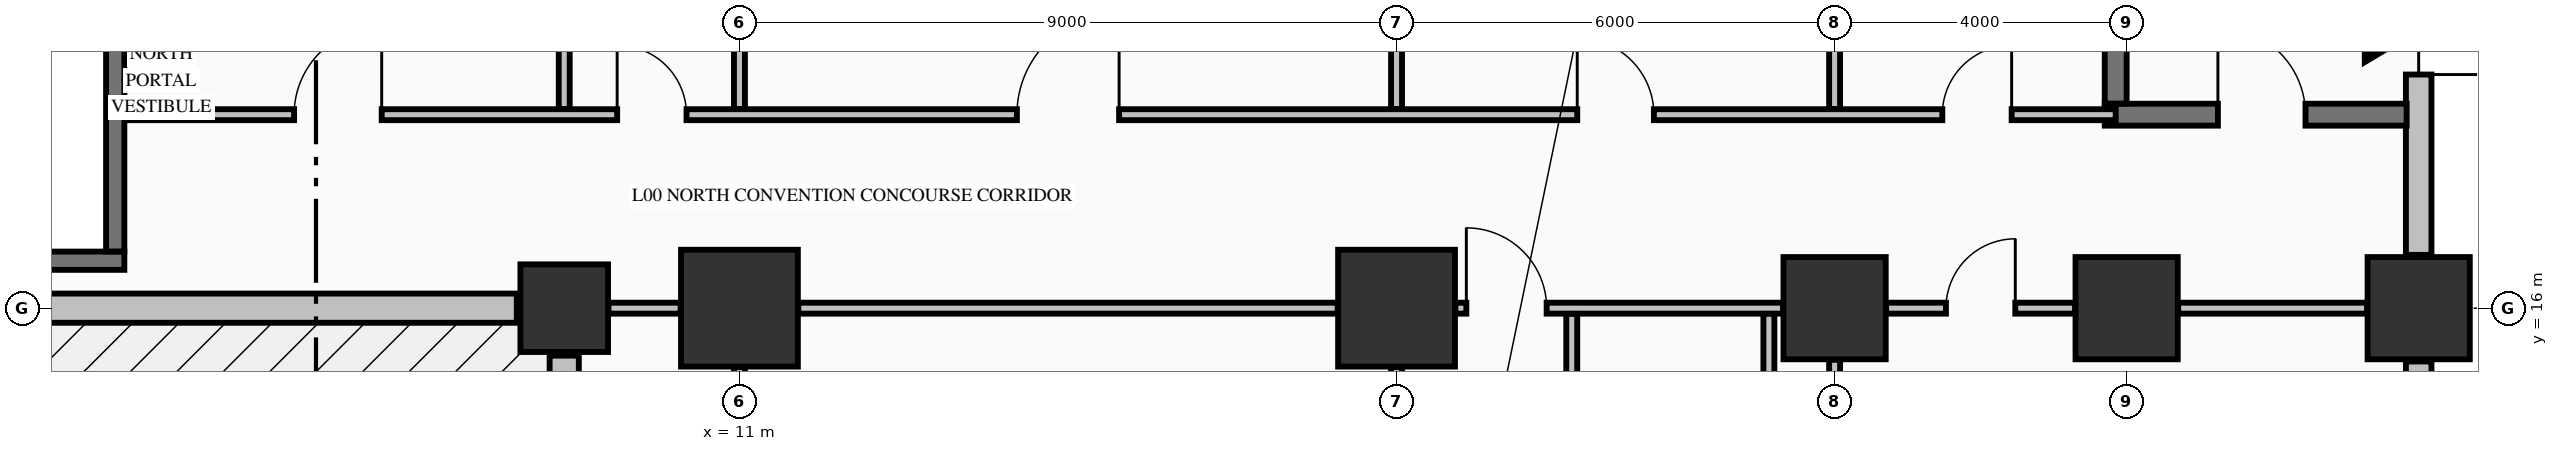
"""IFC4 building model, lengths in metres.
Left out: names, types, materials, properties, quantities, classifications, styles, units other than length and angle.
Written with IfcOpenShell. Run it as: python <this file> out.ifc"""

import sys

from ifc_helpers import new_model, si_unit, direction, frame, frame_2d, origin, origin_2d, place, context, subcontext, project, spatial, rectangle, extrude, element, fill, save


model = new_model("IFC4")
c1 = context("Model", 3, precision=1e-05, world=origin(), true_north=direction((0.0, 1.0)))
c2 = subcontext(c1, "Body", "Model", "MODEL_VIEW")
j1 = project(units=[si_unit("LENGTHUNIT", "METRE"), si_unit("PLANEANGLEUNIT", "RADIAN")], contexts=[c1])
p1 = place(None, origin())
s1 = spatial("IfcSite", under=j1, at=p1, CompositionType="ELEMENT")
p2 = place(p1, origin())
s2 = spatial("IfcBuilding", under=s1, at=p2, CompositionType="ELEMENT")
p3 = place(p2, origin())
s3 = spatial("IfcBuildingStorey", under=s2, at=p3, CompositionType="ELEMENT", Elevation=0.0)
for number, where, z_axis, x_axis in (
    (1, (11.0, 16.0, 0.0), (0.0, 0.0, 1.0), (1.0, 0.0, 0.0)),
    (2, (20.0, 16.0, 0.0), (0.0, 0.0, 1.0), (1.0, 0.0, 0.0)),
):
    element("IfcColumn", number, at=place(p3, frame(where, z_axis=z_axis, x_axis=x_axis)), inside=s3, PredefinedType="COLUMN", context=c2, shape_type="SweptSolid", body=[
        extrude(rectangle(XDim=1.6, YDim=1.6, at=origin_2d()), origin(), (0.0, 0.0, 1.0), 5.09),
    ])
for number, where, z_axis, x_axis in (
    (3, (26.0, 16.0, 0.0), (0.0, 0.0, 1.0), (1.0, 0.0, 0.0)),
    (4, (30.0, 16.0, 0.0), (0.0, 0.0, 1.0), (1.0, 0.0, 0.0)),
    (5, (34.0, 16.0, 0.0), (0.0, 0.0, 1.0), (1.0, 0.0, 0.0)),
):
    element("IfcColumn", number, at=place(p3, frame(where, z_axis=z_axis, x_axis=x_axis)), inside=s3, PredefinedType="COLUMN", context=c2, shape_type="SweptSolid", body=[
        extrude(rectangle(XDim=1.4, YDim=1.4, at=origin_2d()), origin(), (0.0, 0.0, 1.0), 5.09),
    ])
p4 = place(p3, frame((8.6, 16.0, 0.0), z_axis=(0.0, 0.0, 1.0), x_axis=(1.0, 0.0, 0.0)))
e6 = element("IfcColumn", 6, at=p4, inside=s3, PredefinedType="COLUMN", context=c2, shape_type="SweptSolid", body=[
    extrude(rectangle(XDim=1.2, YDim=1.2, at=origin_2d()), origin(), (0.0, 0.0, 1.0), 5.09),
])
p5 = place(p3, frame((34.0, 15.27, 0.0), z_axis=(0.0, 0.0, 1.0), x_axis=(0.0, -1.0, 0.0)))
e7 = element("IfcWall", 7, at=p5, inside=s3, PredefinedType="STANDARD", context=c2, shape_type="SweptSolid", body=[
    extrude(rectangle(XDim=5.54, YDim=0.35, at=frame_2d((2.77, 0.0))), origin(), (0.0, 0.0, 1.0), 4.482),
])
p6 = place(p5, frame((1.72, 0.0, 0.75)))
e8 = element("IfcOpeningElement", 8, at=p6, cuts=e7, PredefinedType="OPENING", context=c2, shape_type="SweptSolid", body=[
    extrude(rectangle(XDim=2.1, YDim=1.75, at=frame_2d((1.05, 0.875))), frame((0.0, 0.185, 0.0), z_axis=(0.0, -1.0, 0.0), x_axis=(1.0, 0.0, 0.0)), (0.0, 0.0, 1.0), 0.37),
])
p7 = place(p3, frame((34.0, 21.27, 0.0), z_axis=(0.0, 0.0, 1.0), x_axis=(0.0, -1.0, 0.0)))
e9 = element("IfcWall", 9, at=p7, inside=s3, PredefinedType="STANDARD", context=c2, shape_type="SweptSolid", body=[
    extrude(rectangle(XDim=4.54, YDim=0.35, at=frame_2d((2.27, 0.0))), origin(), (0.0, 0.0, 1.0), 5.09),
])
p8 = place(p7, frame((0.87, 0.0, 0.0)))
e10 = element("IfcOpeningElement", 10, at=p8, cuts=e9, PredefinedType="OPENING", context=c2, shape_type="SweptSolid", body=[
    extrude(rectangle(XDim=1.2, YDim=2.2, at=frame_2d((0.6, 1.1))), frame((0.0, 0.185, 0.0), z_axis=(0.0, -1.0, 0.0), x_axis=(1.0, 0.0, 0.0)), (0.0, 0.0, 1.0), 0.37),
])
p9 = place(p3, frame((8.6, 15.35, 0.0), z_axis=(0.0, 0.0, 1.0), x_axis=(0.0, -1.0, 0.0)))
e11 = element("IfcWall", 11, at=p9, inside=s3, PredefinedType="STANDARD", context=c2, shape_type="SweptSolid", body=[
    extrude(rectangle(XDim=14.7, YDim=0.4, at=frame_2d((7.35, 0.0))), origin(), (0.0, 0.0, 1.0), 4.132),
])
p10 = place(p3, frame((0.73, 16.0, 0.0), z_axis=(0.0, 0.0, 1.0), x_axis=(1.0, 0.0, 0.0)))
e12 = element("IfcWall", 12, at=p10, inside=s3, PredefinedType="STANDARD", context=c2, shape_type="SweptSolid", body=[
    extrude(rectangle(XDim=7.22, YDim=0.4, at=frame_2d((3.61, 0.0))), origin(), (0.0, 0.0, 1.0), 4.132),
])
p11 = place(p3, frame((0.704, 16.65, 0.0), z_axis=(0.0, 0.0, 1.0), x_axis=(1.0, 0.0, 0.0)))
e13 = element("IfcWall", 13, at=p11, inside=s3, PredefinedType="SOLIDWALL", context=c2, shape_type="SweptSolid", body=[
    extrude(rectangle(XDim=1.871, YDim=0.25, at=frame_2d((0.936, 0.0))), origin(), (0.0, 0.0, 1.0), 5.09),
])
p12 = place(p3, frame((29.7, 18.65, 0.0), z_axis=(0.0, 0.0, 1.0), x_axis=(1.0, 0.0, 0.0)))
e14 = element("IfcWall", 14, at=p12, inside=s3, PredefinedType="SHEAR", context=c2, shape_type="SweptSolid", body=[
    extrude(rectangle(XDim=4.135, YDim=0.3, at=frame_2d((2.067, 0.0))), origin(), (0.0, 0.0, 1.0), 5.09),
])
p13 = place(p12, frame((1.55, 0.0, 0.0)))
e15 = element("IfcOpeningElement", 15, at=p13, cuts=e14, PredefinedType="OPENING", context=c2, shape_type="SweptSolid", body=[
    extrude(rectangle(XDim=1.2, YDim=2.15, at=frame_2d((0.6, 1.075))), frame((0.0, 0.16, 0.0), z_axis=(0.0, -1.0, 0.0), x_axis=(1.0, 0.0, 0.0)), (0.0, 0.0, 1.0), 0.32),
])
p14 = place(p3, frame((9.206, 16.0, 0.0), z_axis=(0.0, 0.0, 1.0), x_axis=(1.0, 0.0, 0.0)))
e16 = element("IfcWall", 16, at=p14, inside=s3, PredefinedType="PARTITIONING", context=c2, shape_type="SweptSolid", body=[
    extrude(rectangle(XDim=0.988, YDim=0.15, at=frame_2d((0.494, 0.0))), origin(), (0.0, 0.0, 1.0), 4.132),
])
p15 = place(p3, frame((11.806, 16.0, 0.0), z_axis=(0.0, 0.0, 1.0), x_axis=(1.0, 0.0, 0.0)))
e17 = element("IfcWall", 17, at=p15, inside=s3, PredefinedType="PARTITIONING", context=c2, shape_type="SweptSolid", body=[
    extrude(rectangle(XDim=7.388, YDim=0.15, at=frame_2d((3.694, 0.0))), origin(), (0.0, 0.0, 1.0), 4.132),
])
p16 = place(p3, frame((20.806, 16.0, 0.0), z_axis=(0.0, 0.0, 1.0), x_axis=(1.0, 0.0, 0.0)))
e18 = element("IfcWall", 18, at=p16, inside=s3, PredefinedType="PARTITIONING", context=c2, shape_type="SweptSolid", body=[
    extrude(rectangle(XDim=4.488, YDim=0.15, at=frame_2d((2.244, 0.0))), origin(), (0.0, 0.0, 1.0), 4.132),
])
p17 = place(p16, frame((0.15, 0.0, 0.0)))
e19 = element("IfcOpeningElement", 19, at=p17, cuts=e18, PredefinedType="OPENING", context=c2, shape_type="SweptSolid", body=[
    extrude(rectangle(XDim=1.1, YDim=2.15, at=frame_2d((0.55, 1.075))), frame((0.0, 0.085, 0.0), z_axis=(0.0, -1.0, 0.0), x_axis=(1.0, 0.0, 0.0)), (0.0, 0.0, 1.0), 0.17),
])
p18 = place(p3, frame((26.706, 16.0, 0.0), z_axis=(0.0, 0.0, 1.0), x_axis=(1.0, 0.0, 0.0)))
e20 = element("IfcWall", 20, at=p18, inside=s3, PredefinedType="PARTITIONING", context=c2, shape_type="SweptSolid", body=[
    extrude(rectangle(XDim=2.588, YDim=0.15, at=frame_2d((1.294, 0.0))), origin(), (0.0, 0.0, 1.0), 4.132),
])
p19 = place(p18, frame((0.819, 0.0, 0.0)))
e21 = element("IfcOpeningElement", 21, at=p19, cuts=e20, PredefinedType="OPENING", context=c2, shape_type="SweptSolid", body=[
    extrude(rectangle(XDim=0.95, YDim=2.15, at=frame_2d((0.475, 1.075))), frame((0.0, 0.085, 0.0), z_axis=(0.0, -1.0, 0.0), x_axis=(1.0, 0.0, 0.0)), (0.0, 0.0, 1.0), 0.17),
])
p20 = place(p3, frame((30.706, 16.0, 0.0), z_axis=(0.0, 0.0, 1.0), x_axis=(1.0, 0.0, 0.0)))
e22 = element("IfcWall", 22, at=p20, inside=s3, PredefinedType="PARTITIONING", context=c2, shape_type="SweptSolid", body=[
    extrude(rectangle(XDim=2.588, YDim=0.15, at=frame_2d((1.294, 0.0))), origin(), (0.0, 0.0, 1.0), 4.132),
])
p21 = place(p3, frame((2.578, 18.65, 0.0), z_axis=(0.0, 0.0, 1.0), x_axis=(1.0, 0.0, 0.0)))
e23 = element("IfcWall", 23, at=p21, inside=s3, PredefinedType="PARTITIONING", context=c2, shape_type="SweptSolid", body=[
    extrude(rectangle(XDim=27.272, YDim=0.15, at=frame_2d((13.636, 0.0))), origin(), (0.0, 0.0, 1.0), 5.09),
])
p22 = place(p21, frame((2.322, 0.0, 0.0)))
e24 = element("IfcOpeningElement", 24, at=p22, cuts=e23, PredefinedType="OPENING", context=c2, shape_type="SweptSolid", body=[
    extrude(rectangle(XDim=1.2, YDim=2.15, at=frame_2d((0.6, 1.075))), frame((0.0, 0.085, 0.0), z_axis=(0.0, -1.0, 0.0), x_axis=(1.0, 0.0, 0.0)), (0.0, 0.0, 1.0), 0.17),
])
p23 = place(p21, frame((6.747, 0.0, 0.0)))
e25 = element("IfcOpeningElement", 25, at=p23, cuts=e23, PredefinedType="OPENING", context=c2, shape_type="SweptSolid", body=[
    extrude(rectangle(XDim=0.95, YDim=2.15, at=frame_2d((0.475, 1.075))), frame((0.0, 0.085, 0.0), z_axis=(0.0, -1.0, 0.0), x_axis=(1.0, 0.0, 0.0)), (0.0, 0.0, 1.0), 0.17),
])
p24 = place(p21, frame((12.222, 0.0, 0.0)))
e26 = element("IfcOpeningElement", 26, at=p24, cuts=e23, PredefinedType="OPENING", context=c2, shape_type="SweptSolid", body=[
    extrude(rectangle(XDim=1.4, YDim=2.2, at=frame_2d((0.7, 1.1))), frame((0.0, 0.085, 0.0), z_axis=(0.0, -1.0, 0.0), x_axis=(1.0, 0.0, 0.0)), (0.0, 0.0, 1.0), 0.17),
])
p25 = place(p21, frame((19.897, 0.0, 0.0)))
e27 = element("IfcOpeningElement", 27, at=p25, cuts=e23, PredefinedType="OPENING", context=c2, shape_type="SweptSolid", body=[
    extrude(rectangle(XDim=1.05, YDim=2.15, at=frame_2d((0.525, 1.075))), frame((0.0, 0.085, 0.0), z_axis=(0.0, -1.0, 0.0), x_axis=(1.0, 0.0, 0.0)), (0.0, 0.0, 1.0), 0.17),
])
p26 = place(p21, frame((24.897, 0.0, 0.0)))
e28 = element("IfcOpeningElement", 28, at=p26, cuts=e23, PredefinedType="OPENING", context=c2, shape_type="SweptSolid", body=[
    extrude(rectangle(XDim=0.95, YDim=2.15, at=frame_2d((0.475, 1.075))), frame((0.0, 0.085, 0.0), z_axis=(0.0, -1.0, 0.0), x_axis=(1.0, 0.0, 0.0)), (0.0, 0.0, 1.0), 0.17),
])
p27 = place(p3, frame((2.45, 16.777, 0.0), z_axis=(0.0, 0.0, 1.0), x_axis=(0.0, 1.0, 0.0)))
e29 = element("IfcWall", 29, at=p27, inside=s3, PredefinedType="SOLIDWALL", context=c2, shape_type="SweptSolid", body=[
    extrude(rectangle(XDim=4.446, YDim=0.25, at=frame_2d((2.223, 0.0))), origin(), (0.0, 0.0, 1.0), 5.09),
])
p28 = place(p3, frame((29.85, 18.802, 0.0), z_axis=(0.0, 0.0, 1.0), x_axis=(0.0, 1.0, 0.0)))
e30 = element("IfcWall", 30, at=p28, inside=s3, PredefinedType="SHEAR", context=c2, shape_type="SweptSolid", body=[
    extrude(rectangle(XDim=9.494, YDim=0.3, at=frame_2d((4.747, 0.0))), origin(), (0.0, 0.0, 1.0), 5.09),
])
p29 = place(p3, frame((8.6, 18.728, 0.0), z_axis=(0.0, 0.0, 1.0), x_axis=(0.0, 1.0, 0.0)))
e31 = element("IfcWall", 31, at=p29, inside=s3, PredefinedType="PARTITIONING", context=c2, shape_type="SweptSolid", body=[
    extrude(rectangle(XDim=2.666, YDim=0.15, at=frame_2d((1.333, 0.0))), origin(), (0.0, 0.0, 1.0), 4.132),
])
p30 = place(p3, frame((11.0, 13.078, 0.0), z_axis=(0.0, 0.0, 1.0), x_axis=(0.0, 1.0, 0.0)))
e32 = element("IfcWall", 32, at=p30, inside=s3, PredefinedType="PARTITIONING", context=c2, shape_type="SweptSolid", body=[
    extrude(rectangle(XDim=2.116, YDim=0.15, at=frame_2d((1.058, 0.0))), origin(), (0.0, 0.0, 1.0), 4.132),
])
p31 = place(p3, frame((11.0, 18.728, 0.0), z_axis=(0.0, 0.0, 1.0), x_axis=(0.0, 1.0, 0.0)))
e33 = element("IfcWall", 33, at=p31, inside=s3, PredefinedType="PARTITIONING", context=c2, shape_type="SweptSolid", body=[
    extrude(rectangle(XDim=2.466, YDim=0.15, at=frame_2d((1.233, 0.0))), origin(), (0.0, 0.0, 1.0), 4.132),
])
p32 = place(p3, frame((20.0, 13.078, 0.0), z_axis=(0.0, 0.0, 1.0), x_axis=(0.0, 1.0, 0.0)))
e34 = element("IfcWall", 34, at=p32, inside=s3, PredefinedType="PARTITIONING", context=c2, shape_type="SweptSolid", body=[
    extrude(rectangle(XDim=2.116, YDim=0.15, at=frame_2d((1.058, 0.0))), origin(), (0.0, 0.0, 1.0), 4.132),
])
p33 = place(p3, frame((20.0, 18.728, 0.0), z_axis=(0.0, 0.0, 1.0), x_axis=(0.0, 1.0, 0.0)))
e35 = element("IfcWall", 35, at=p33, inside=s3, PredefinedType="PARTITIONING", context=c2, shape_type="SweptSolid", body=[
    extrude(rectangle(XDim=2.466, YDim=0.15, at=frame_2d((1.233, 0.0))), origin(), (0.0, 0.0, 1.0), 4.132),
])
p34 = place(p3, frame((22.4, 13.228, 0.0), z_axis=(0.0, 0.0, 1.0), x_axis=(0.0, 1.0, 0.0)))
e36 = element("IfcWall", 36, at=p34, inside=s3, PredefinedType="PARTITIONING", context=c2, shape_type="SweptSolid", body=[
    extrude(rectangle(XDim=2.694, YDim=0.15, at=frame_2d((1.347, 0.0))), origin(), (0.0, 0.0, 1.0), 5.09),
])
p35 = place(p34, frame((0.797, 0.0, 0.0)))
e37 = element("IfcOpeningElement", 37, at=p35, cuts=e36, PredefinedType="OPENING", context=c2, shape_type="SweptSolid", body=[
    extrude(rectangle(XDim=1.05, YDim=2.15, at=frame_2d((0.525, 1.075))), frame((0.0, 0.085, 0.0), z_axis=(0.0, -1.0, 0.0), x_axis=(1.0, 0.0, 0.0)), (0.0, 0.0, 1.0), 0.17),
])
p36 = place(p3, frame((25.1, 13.228, 0.0), z_axis=(0.0, 0.0, 1.0), x_axis=(0.0, 1.0, 0.0)))
e38 = element("IfcWall", 38, at=p36, inside=s3, PredefinedType="PARTITIONING", context=c2, shape_type="SweptSolid", body=[
    extrude(rectangle(XDim=2.694, YDim=0.15, at=frame_2d((1.347, 0.0))), origin(), (0.0, 0.0, 1.0), 5.09),
])
p37 = place(p3, frame((26.0, 13.228, 0.0), z_axis=(0.0, 0.0, 1.0), x_axis=(0.0, 1.0, 0.0)))
e39 = element("IfcWall", 39, at=p37, inside=s3, PredefinedType="PARTITIONING", context=c2, shape_type="SweptSolid", body=[
    extrude(rectangle(XDim=2.066, YDim=0.15, at=frame_2d((1.033, 0.0))), origin(), (0.0, 0.0, 1.0), 4.132),
])
p38 = place(p3, frame((26.0, 18.728, 0.0), z_axis=(0.0, 0.0, 1.0), x_axis=(0.0, 1.0, 0.0)))
e40 = element("IfcWall", 40, at=p38, inside=s3, PredefinedType="PARTITIONING", context=c2, shape_type="SweptSolid", body=[
    extrude(rectangle(XDim=2.566, YDim=0.15, at=frame_2d((1.283, 0.0))), origin(), (0.0, 0.0, 1.0), 4.132),
])
p39 = place(p8, origin())
e41 = element("IfcDoor", 41, at=p39, inside=s3, OperationType="SINGLE_SWING_RIGHT", PredefinedType="DOOR", context=c2, shape_type="SweptSolid", body=[
    extrude(rectangle(XDim=1.2, YDim=2.2, at=frame_2d((0.6, 1.1))), frame((0.0, 0.025, 0.0), z_axis=(0.0, -1.0, 0.0), x_axis=(1.0, 0.0, 0.0)), (0.0, 0.0, 1.0), 0.05),
])
fill(e10, e41)
p40 = place(p13, origin())
e42 = element("IfcDoor", 42, at=p40, inside=s3, OperationType="SINGLE_SWING_LEFT", PredefinedType="DOOR", context=c2, shape_type="SweptSolid", body=[
    extrude(rectangle(XDim=1.2, YDim=2.15, at=frame_2d((0.6, 1.075))), frame((0.0, 0.025, 0.0), z_axis=(0.0, -1.0, 0.0), x_axis=(1.0, 0.0, 0.0)), (0.0, 0.0, 1.0), 0.05),
])
fill(e15, e42)
p41 = place(p17, origin())
e43 = element("IfcDoor", 43, at=p41, inside=s3, OperationType="SINGLE_SWING_LEFT", PredefinedType="DOOR", context=c2, shape_type="SweptSolid", body=[
    extrude(rectangle(XDim=1.1, YDim=2.15, at=frame_2d((0.55, 1.075))), frame((0.0, 0.025, 0.0), z_axis=(0.0, -1.0, 0.0), x_axis=(1.0, 0.0, 0.0)), (0.0, 0.0, 1.0), 0.05),
])
fill(e19, e43)
p42 = place(p22, origin())
e44 = element("IfcDoor", 44, at=p42, inside=s3, OperationType="SINGLE_SWING_RIGHT", PredefinedType="DOOR", context=c2, shape_type="SweptSolid", body=[
    extrude(rectangle(XDim=1.2, YDim=2.15, at=frame_2d((0.6, 1.075))), frame((0.0, 0.025, 0.0), z_axis=(0.0, -1.0, 0.0), x_axis=(1.0, 0.0, 0.0)), (0.0, 0.0, 1.0), 0.05),
])
fill(e24, e44)
p43 = place(p19, origin())
e45 = element("IfcDoor", 45, at=p43, inside=s3, OperationType="SINGLE_SWING_RIGHT", PredefinedType="DOOR", context=c2, shape_type="SweptSolid", body=[
    extrude(rectangle(XDim=0.95, YDim=2.15, at=frame_2d((0.475, 1.075))), frame((0.0, 0.025, 0.0), z_axis=(0.0, -1.0, 0.0), x_axis=(1.0, 0.0, 0.0)), (0.0, 0.0, 1.0), 0.05),
])
fill(e21, e45)
p44 = place(p23, origin())
e46 = element("IfcDoor", 46, at=p44, inside=s3, OperationType="SINGLE_SWING_LEFT", PredefinedType="DOOR", context=c2, shape_type="SweptSolid", body=[
    extrude(rectangle(XDim=0.95, YDim=2.15, at=frame_2d((0.475, 1.075))), frame((0.0, 0.025, 0.0), z_axis=(0.0, -1.0, 0.0), x_axis=(1.0, 0.0, 0.0)), (0.0, 0.0, 1.0), 0.05),
])
fill(e25, e46)
p45 = place(p24, origin())
e47 = element("IfcDoor", 47, at=p45, inside=s3, OperationType="SINGLE_SWING_RIGHT", PredefinedType="DOOR", context=c2, shape_type="SweptSolid", body=[
    extrude(rectangle(XDim=1.4, YDim=2.2, at=frame_2d((0.7, 1.1))), frame((0.0, 0.025, 0.0), z_axis=(0.0, -1.0, 0.0), x_axis=(1.0, 0.0, 0.0)), (0.0, 0.0, 1.0), 0.05),
])
fill(e26, e47)
p46 = place(p25, origin())
e48 = element("IfcDoor", 48, at=p46, inside=s3, OperationType="SINGLE_SWING_LEFT", PredefinedType="DOOR", context=c2, shape_type="SweptSolid", body=[
    extrude(rectangle(XDim=1.05, YDim=2.15, at=frame_2d((0.525, 1.075))), frame((0.0, 0.025, 0.0), z_axis=(0.0, -1.0, 0.0), x_axis=(1.0, 0.0, 0.0)), (0.0, 0.0, 1.0), 0.05),
])
fill(e27, e48)
p47 = place(p26, origin())
e49 = element("IfcDoor", 49, at=p47, inside=s3, OperationType="SINGLE_SWING_RIGHT", PredefinedType="DOOR", context=c2, shape_type="SweptSolid", body=[
    extrude(rectangle(XDim=0.95, YDim=2.15, at=frame_2d((0.475, 1.075))), frame((0.0, 0.025, 0.0), z_axis=(0.0, -1.0, 0.0), x_axis=(1.0, 0.0, 0.0)), (0.0, 0.0, 1.0), 0.05),
])
fill(e28, e49)
save(model, sys.argv[1])
